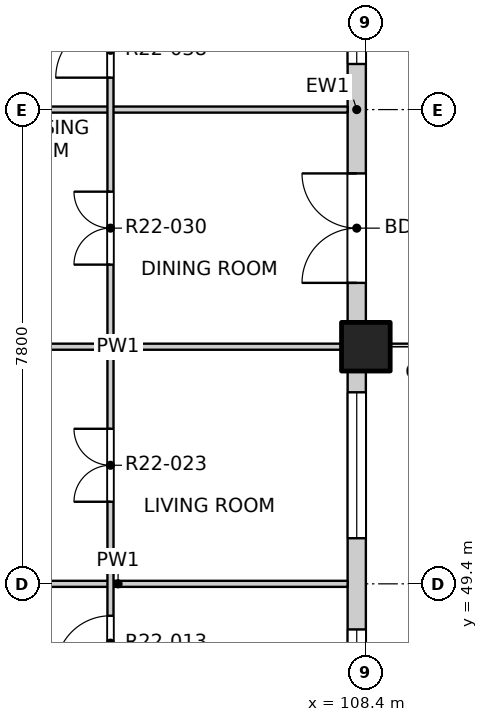
"""IFC4 building model, lengths in metres.
Left out: names, types, materials, properties, quantities, classifications, styles, units other than length and angle.
Written with IfcOpenShell. Run it as: python <this file> out.ifc"""

import sys

from ifc_helpers import new_model, si_unit, direction, frame, frame_2d, origin, origin_2d, place, context, subcontext, project, spatial, rectangle, extrude, element, fill, save


model = new_model("IFC4")
c1 = context("Model", 3, precision=1e-05, world=origin(), true_north=direction((0.0, 1.0)))
c2 = subcontext(c1, "Body", "Model", "MODEL_VIEW")
j1 = project(units=[si_unit("LENGTHUNIT", "METRE"), si_unit("PLANEANGLEUNIT", "RADIAN")], contexts=[c1])
p1 = place(None, origin())
s1 = spatial("IfcSite", under=j1, at=p1, CompositionType="ELEMENT")
p2 = place(p1, origin())
s2 = spatial("IfcBuilding", under=s1, at=p2, CompositionType="ELEMENT")
p3 = place(p2, frame((0.0, 0.0, 231.3)))
s3 = spatial("IfcBuildingStorey", under=s2, at=p3, CompositionType="ELEMENT", Elevation=231.3)
p4 = place(p3, frame((108.4, 53.3, -0.25), z_axis=(0.0, 0.0, 1.0), x_axis=(1.0, 0.0, 0.0)))
e1 = element("IfcColumn", 1, at=p4, inside=s3, PredefinedType="COLUMN", context=c2, shape_type="SweptSolid", body=[
    extrude(rectangle(XDim=0.8, YDim=0.8, at=origin_2d()), origin(), (0.0, 0.0, 1.0), 3.4),
])
p5 = place(p3, frame((108.25, 45.5, 0.0), z_axis=(0.0, 0.0, 1.0), x_axis=(0.0, 1.0, 0.0)))
e2 = element("IfcWall", 2, at=p5, inside=s3, PredefinedType="SOLIDWALL", context=c2, shape_type="SweptSolid", body=[
    extrude(rectangle(XDim=7.4, YDim=0.3, at=frame_2d((3.7, 0.0))), origin(), (0.0, 0.0, 1.0), 2.7),
])
p6 = place(p5, frame((0.75, 0.0, 0.9)))
e3 = element("IfcOpeningElement", 3, at=p6, cuts=e2, PredefinedType="OPENING", context=c2, shape_type="SweptSolid", body=[
    extrude(rectangle(XDim=2.4, YDim=1.8, at=frame_2d((1.2, 0.9))), frame((0.0, 0.16, 0.0), z_axis=(0.0, -1.0, 0.0), x_axis=(1.0, 0.0, 0.0)), (0.0, 0.0, 1.0), 0.32),
])
p7 = place(p5, frame((4.65, 0.0, 0.9)))
e4 = element("IfcOpeningElement", 4, at=p7, cuts=e2, PredefinedType="OPENING", context=c2, shape_type="SweptSolid", body=[
    extrude(rectangle(XDim=2.4, YDim=1.8, at=frame_2d((1.2, 0.9))), frame((0.0, 0.16, 0.0), z_axis=(0.0, -1.0, 0.0), x_axis=(1.0, 0.0, 0.0)), (0.0, 0.0, 1.0), 0.32),
])
p8 = place(p3, frame((108.25, 53.7, 0.0), z_axis=(0.0, 0.0, 1.0), x_axis=(0.0, 1.0, 0.0)))
e5 = element("IfcWall", 5, at=p8, inside=s3, PredefinedType="SOLIDWALL", context=c2, shape_type="SweptSolid", body=[
    extrude(rectangle(XDim=7.0, YDim=0.3, at=frame_2d((3.5, 0.0))), origin(), (0.0, 0.0, 1.0), 2.7),
])
p9 = place(p8, frame((0.65, 0.0, 0.0)))
e6 = element("IfcOpeningElement", 6, at=p9, cuts=e5, PredefinedType="OPENING", context=c2, shape_type="SweptSolid", body=[
    extrude(rectangle(XDim=1.8, YDim=2.4, at=frame_2d((0.9, 1.2))), frame((0.0, 0.16, 0.0), z_axis=(0.0, -1.0, 0.0), x_axis=(1.0, 0.0, 0.0)), (0.0, 0.0, 1.0), 0.32),
])
p10 = place(p8, frame((4.25, 0.0, 0.9)))
e7 = element("IfcOpeningElement", 7, at=p10, cuts=e5, PredefinedType="OPENING", context=c2, shape_type="SweptSolid", body=[
    extrude(rectangle(XDim=2.4, YDim=1.8, at=frame_2d((1.2, 0.9))), frame((0.0, 0.16, 0.0), z_axis=(0.0, -1.0, 0.0), x_axis=(1.0, 0.0, 0.0)), (0.0, 0.0, 1.0), 0.32),
])
for number, where, z_axis, x_axis in (
    (8, (100.55, 49.4, 0.0), (0.0, 0.0, 1.0), (1.0, 0.0, 0.0)),
    (9, (100.55, 53.3, 0.0), (0.0, 0.0, 1.0), (1.0, 0.0, 0.0)),
    (10, (100.55, 57.2, 0.0), (0.0, 0.0, 1.0), (1.0, 0.0, 0.0)),
):
    element("IfcWall", number, at=place(p3, frame(where, z_axis=z_axis, x_axis=x_axis)), inside=s3, PredefinedType="PARTITIONING", context=c2, shape_type="SweptSolid", body=[
        extrude(rectangle(XDim=7.55, YDim=0.1, at=frame_2d((3.775, 0.0))), origin(), (0.0, 0.0, 1.0), 3.15),
    ])
p11 = place(p3, frame((104.2, 41.9, 0.0), z_axis=(0.0, 0.0, 1.0), x_axis=(0.0, 1.0, 0.0)))
e11 = element("IfcWall", 11, at=p11, inside=s3, PredefinedType="PARTITIONING", context=c2, shape_type="SweptSolid", body=[
    extrude(rectangle(XDim=34.7, YDim=0.1, at=frame_2d((17.35, 0.0))), origin(), (0.0, 0.0, 1.0), 3.15),
])
p12 = place(p11, frame((1.05, 0.0, 0.0)))
e12 = element("IfcOpeningElement", 12, at=p12, cuts=e11, PredefinedType="OPENING", context=c2, shape_type="SweptSolid", body=[
    extrude(rectangle(XDim=1.2, YDim=2.1, at=frame_2d((0.6, 1.05))), frame((0.0, 0.06, 0.0), z_axis=(0.0, -1.0, 0.0), x_axis=(1.0, 0.0, 0.0)), (0.0, 0.0, 1.0), 0.12),
])
p13 = place(p11, frame((4.125, 0.0, 0.0)))
e13 = element("IfcOpeningElement", 13, at=p13, cuts=e11, PredefinedType="OPENING", context=c2, shape_type="SweptSolid", body=[
    extrude(rectangle(XDim=0.9, YDim=2.1, at=frame_2d((0.45, 1.05))), frame((0.0, 0.06, 0.0), z_axis=(0.0, -1.0, 0.0), x_axis=(1.0, 0.0, 0.0)), (0.0, 0.0, 1.0), 0.12),
])
p14 = place(p11, frame((6.075, 0.0, 0.0)))
e14 = element("IfcOpeningElement", 14, at=p14, cuts=e11, PredefinedType="OPENING", context=c2, shape_type="SweptSolid", body=[
    extrude(rectangle(XDim=0.9, YDim=2.1, at=frame_2d((0.45, 1.05))), frame((0.0, 0.06, 0.0), z_axis=(0.0, -1.0, 0.0), x_axis=(1.0, 0.0, 0.0)), (0.0, 0.0, 1.0), 0.12),
])
p15 = place(p11, frame((8.85, 0.0, 0.0)))
e15 = element("IfcOpeningElement", 15, at=p15, cuts=e11, PredefinedType="OPENING", context=c2, shape_type="SweptSolid", body=[
    extrude(rectangle(XDim=1.2, YDim=2.1, at=frame_2d((0.6, 1.05))), frame((0.0, 0.06, 0.0), z_axis=(0.0, -1.0, 0.0), x_axis=(1.0, 0.0, 0.0)), (0.0, 0.0, 1.0), 0.12),
])
p16 = place(p11, frame((12.75, 0.0, 0.0)))
e16 = element("IfcOpeningElement", 16, at=p16, cuts=e11, PredefinedType="OPENING", context=c2, shape_type="SweptSolid", body=[
    extrude(rectangle(XDim=1.2, YDim=2.1, at=frame_2d((0.6, 1.05))), frame((0.0, 0.06, 0.0), z_axis=(0.0, -1.0, 0.0), x_axis=(1.0, 0.0, 0.0)), (0.0, 0.0, 1.0), 0.12),
])
p17 = place(p11, frame((15.825, 0.0, 0.0)))
e17 = element("IfcOpeningElement", 17, at=p17, cuts=e11, PredefinedType="OPENING", context=c2, shape_type="SweptSolid", body=[
    extrude(rectangle(XDim=0.9, YDim=2.1, at=frame_2d((0.45, 1.05))), frame((0.0, 0.06, 0.0), z_axis=(0.0, -1.0, 0.0), x_axis=(1.0, 0.0, 0.0)), (0.0, 0.0, 1.0), 0.12),
])
p18 = place(p11, frame((17.775, 0.0, 0.0)))
e18 = element("IfcOpeningElement", 18, at=p18, cuts=e11, PredefinedType="OPENING", context=c2, shape_type="SweptSolid", body=[
    extrude(rectangle(XDim=0.9, YDim=2.1, at=frame_2d((0.45, 1.05))), frame((0.0, 0.06, 0.0), z_axis=(0.0, -1.0, 0.0), x_axis=(1.0, 0.0, 0.0)), (0.0, 0.0, 1.0), 0.12),
])
p19 = place(p11, frame((19.725, 0.0, 0.0)))
e19 = element("IfcOpeningElement", 19, at=p19, cuts=e11, PredefinedType="OPENING", context=c2, shape_type="SweptSolid", body=[
    extrude(rectangle(XDim=0.9, YDim=2.1, at=frame_2d((0.45, 1.05))), frame((0.0, 0.06, 0.0), z_axis=(0.0, -1.0, 0.0), x_axis=(1.0, 0.0, 0.0)), (0.0, 0.0, 1.0), 0.12),
])
p20 = place(p11, frame((21.675, 0.0, 0.0)))
e20 = element("IfcOpeningElement", 20, at=p20, cuts=e11, PredefinedType="OPENING", context=c2, shape_type="SweptSolid", body=[
    extrude(rectangle(XDim=0.9, YDim=2.1, at=frame_2d((0.45, 1.05))), frame((0.0, 0.06, 0.0), z_axis=(0.0, -1.0, 0.0), x_axis=(1.0, 0.0, 0.0)), (0.0, 0.0, 1.0), 0.12),
])
p21 = place(p11, frame((23.625, 0.0, 0.0)))
e21 = element("IfcOpeningElement", 21, at=p21, cuts=e11, PredefinedType="OPENING", context=c2, shape_type="SweptSolid", body=[
    extrude(rectangle(XDim=0.9, YDim=2.1, at=frame_2d((0.45, 1.05))), frame((0.0, 0.06, 0.0), z_axis=(0.0, -1.0, 0.0), x_axis=(1.0, 0.0, 0.0)), (0.0, 0.0, 1.0), 0.12),
])
p22 = place(p11, frame((25.575, 0.0, 0.0)))
e22 = element("IfcOpeningElement", 22, at=p22, cuts=e11, PredefinedType="OPENING", context=c2, shape_type="SweptSolid", body=[
    extrude(rectangle(XDim=0.9, YDim=2.1, at=frame_2d((0.45, 1.05))), frame((0.0, 0.06, 0.0), z_axis=(0.0, -1.0, 0.0), x_axis=(1.0, 0.0, 0.0)), (0.0, 0.0, 1.0), 0.12),
])
p23 = place(p11, frame((28.35, 0.0, 0.0)))
e23 = element("IfcOpeningElement", 23, at=p23, cuts=e11, PredefinedType="OPENING", context=c2, shape_type="SweptSolid", body=[
    extrude(rectangle(XDim=1.2, YDim=2.1, at=frame_2d((0.6, 1.05))), frame((0.0, 0.06, 0.0), z_axis=(0.0, -1.0, 0.0), x_axis=(1.0, 0.0, 0.0)), (0.0, 0.0, 1.0), 0.12),
])
p24 = place(p11, frame((31.425, 0.0, 0.0)))
e24 = element("IfcOpeningElement", 24, at=p24, cuts=e11, PredefinedType="OPENING", context=c2, shape_type="SweptSolid", body=[
    extrude(rectangle(XDim=0.9, YDim=2.1, at=frame_2d((0.45, 1.05))), frame((0.0, 0.06, 0.0), z_axis=(0.0, -1.0, 0.0), x_axis=(1.0, 0.0, 0.0)), (0.0, 0.0, 1.0), 0.12),
])
p25 = place(p11, frame((33.375, 0.0, 0.0)))
e25 = element("IfcOpeningElement", 25, at=p25, cuts=e11, PredefinedType="OPENING", context=c2, shape_type="SweptSolid", body=[
    extrude(rectangle(XDim=0.9, YDim=2.1, at=frame_2d((0.45, 1.05))), frame((0.0, 0.06, 0.0), z_axis=(0.0, -1.0, 0.0), x_axis=(1.0, 0.0, 0.0)), (0.0, 0.0, 1.0), 0.12),
])
p26 = place(p6, origin())
e26 = element("IfcWindow", 26, at=p26, inside=s3, PartitioningType="DOUBLE_PANEL_VERTICAL", PredefinedType="WINDOW", context=c2, shape_type="SweptSolid", body=[
    extrude(rectangle(XDim=2.4, YDim=1.8, at=frame_2d((1.2, 0.9))), frame((0.0, 0.03, 0.0), z_axis=(0.0, -1.0, 0.0), x_axis=(1.0, 0.0, 0.0)), (0.0, 0.0, 1.0), 0.06),
])
fill(e3, e26)
p27 = place(p7, origin())
e27 = element("IfcWindow", 27, at=p27, inside=s3, PartitioningType="DOUBLE_PANEL_VERTICAL", PredefinedType="WINDOW", context=c2, shape_type="SweptSolid", body=[
    extrude(rectangle(XDim=2.4, YDim=1.8, at=frame_2d((1.2, 0.9))), frame((0.0, 0.03, 0.0), z_axis=(0.0, -1.0, 0.0), x_axis=(1.0, 0.0, 0.0)), (0.0, 0.0, 1.0), 0.06),
])
fill(e4, e27)
p28 = place(p9, origin())
e28 = element("IfcDoor", 28, at=p28, inside=s3, OperationType="DOUBLE_DOOR_SINGLE_SWING", PredefinedType="DOOR", context=c2, shape_type="SweptSolid", body=[
    extrude(rectangle(XDim=1.8, YDim=2.4, at=frame_2d((0.9, 1.2))), frame((0.0, 0.025, 0.0), z_axis=(0.0, -1.0, 0.0), x_axis=(1.0, 0.0, 0.0)), (0.0, 0.0, 1.0), 0.05),
])
fill(e6, e28)
p29 = place(p10, origin())
e29 = element("IfcWindow", 29, at=p29, inside=s3, PartitioningType="DOUBLE_PANEL_VERTICAL", PredefinedType="WINDOW", context=c2, shape_type="SweptSolid", body=[
    extrude(rectangle(XDim=2.4, YDim=1.8, at=frame_2d((1.2, 0.9))), frame((0.0, 0.03, 0.0), z_axis=(0.0, -1.0, 0.0), x_axis=(1.0, 0.0, 0.0)), (0.0, 0.0, 1.0), 0.06),
])
fill(e7, e29)
p30 = place(p14, origin())
e30 = element("IfcDoor", 30, at=p30, inside=s3, OperationType="SINGLE_SWING_LEFT", PredefinedType="DOOR", context=c2, shape_type="SweptSolid", body=[
    extrude(rectangle(XDim=0.9, YDim=2.1, at=frame_2d((0.45, 1.05))), frame((0.0, 0.025, 0.0), z_axis=(0.0, -1.0, 0.0), x_axis=(1.0, 0.0, 0.0)), (0.0, 0.0, 1.0), 0.05),
])
fill(e14, e30)
p31 = place(p15, origin())
e31 = element("IfcDoor", 31, at=p31, inside=s3, OperationType="DOUBLE_DOOR_SINGLE_SWING", PredefinedType="DOOR", context=c2, shape_type="SweptSolid", body=[
    extrude(rectangle(XDim=1.2, YDim=2.1, at=frame_2d((0.6, 1.05))), frame((0.0, 0.025, 0.0), z_axis=(0.0, -1.0, 0.0), x_axis=(1.0, 0.0, 0.0)), (0.0, 0.0, 1.0), 0.05),
])
fill(e15, e31)
p32 = place(p16, origin())
e32 = element("IfcDoor", 32, at=p32, inside=s3, OperationType="DOUBLE_DOOR_SINGLE_SWING", PredefinedType="DOOR", context=c2, shape_type="SweptSolid", body=[
    extrude(rectangle(XDim=1.2, YDim=2.1, at=frame_2d((0.6, 1.05))), frame((0.0, 0.025, 0.0), z_axis=(0.0, -1.0, 0.0), x_axis=(1.0, 0.0, 0.0)), (0.0, 0.0, 1.0), 0.05),
])
fill(e16, e32)
p33 = place(p17, origin())
e33 = element("IfcDoor", 33, at=p33, inside=s3, OperationType="SINGLE_SWING_LEFT", PredefinedType="DOOR", context=c2, shape_type="SweptSolid", body=[
    extrude(rectangle(XDim=0.9, YDim=2.1, at=frame_2d((0.45, 1.05))), frame((0.0, 0.025, 0.0), z_axis=(0.0, -1.0, 0.0), x_axis=(1.0, 0.0, 0.0)), (0.0, 0.0, 1.0), 0.05),
])
fill(e17, e33)
save(model, sys.argv[1])
